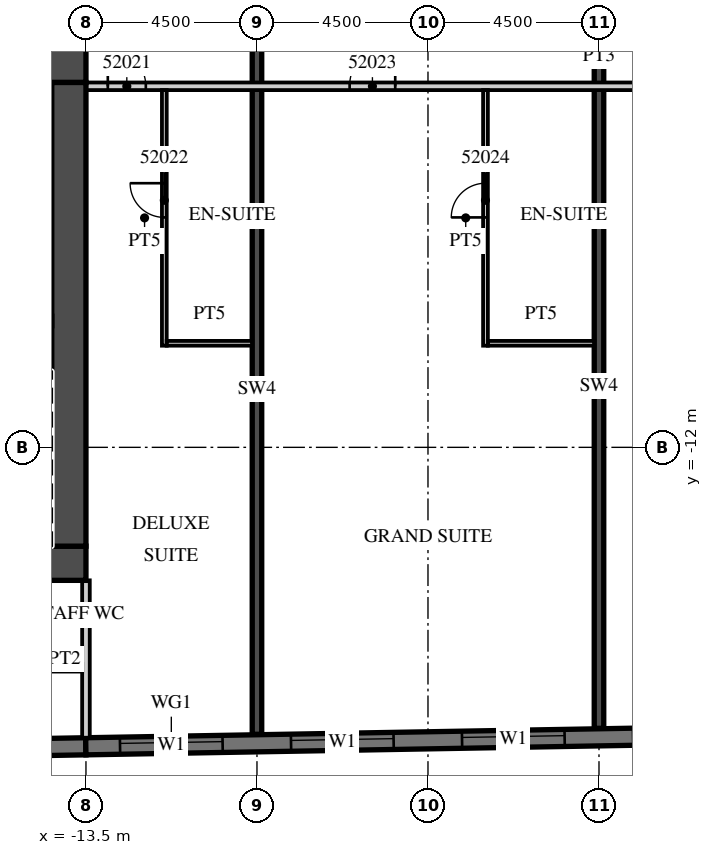
"""IFC4 building model, lengths in metres.
Left out: names, types, materials, properties, quantities, classifications, styles, units other than length and angle.
Written with IfcOpenShell. Run it as: python <this file> out.ifc"""

import sys

from ifc_helpers import new_model, si_unit, direction, frame, frame_2d, origin, place, context, subcontext, project, spatial, rectangle, extrude, element, fill, save


model = new_model("IFC4")
c1 = context("Model", 3, precision=1e-05, world=origin(), true_north=direction((0.0, 1.0)))
c2 = subcontext(c1, "Body", "Model", "MODEL_VIEW")
j1 = project(units=[si_unit("LENGTHUNIT", "METRE"), si_unit("PLANEANGLEUNIT", "RADIAN")], contexts=[c1])
p1 = place(None, origin())
s1 = spatial("IfcSite", under=j1, at=p1, CompositionType="ELEMENT")
p2 = place(p1, origin())
s2 = spatial("IfcBuilding", under=s1, at=p2, CompositionType="ELEMENT")
p3 = place(p2, frame((0.0, 0.0, 217.7)))
s3 = spatial("IfcBuildingStorey", under=s2, at=p3, CompositionType="ELEMENT", Elevation=217.7)
p4 = place(p3, frame((-9.0, -19.55, 0.0), z_axis=(0.0, 0.0, 1.0), x_axis=(0.0, 1.0, 0.0)))
e1 = element("IfcWall", 1, at=p4, inside=s3, PredefinedType="SHEAR", context=c2, shape_type="SweptSolid", body=[
    extrude(rectangle(XDim=18.15, YDim=0.25, at=frame_2d((9.075, 0.0))), origin(), (0.0, 0.0, 1.0), 3.3),
])
p5 = place(p3, frame((0.0, -19.393, 0.0), z_axis=(0.0, 0.0, 1.0), x_axis=(0.0, 1.0, 0.0)))
e2 = element("IfcWall", 2, at=p5, inside=s3, PredefinedType="SHEAR", context=c2, shape_type="SweptSolid", body=[
    extrude(rectangle(XDim=17.993, YDim=0.25, at=frame_2d((8.997, 0.0))), origin(), (0.0, 0.0, 1.0), 3.3),
])
p6 = place(p3, frame((-31.504, -20.18, 0.0), z_axis=(0.0, 0.0, 1.0), x_axis=(0.999847677887, 0.017453395744, 0.0)))
e3 = element("IfcWall", 3, at=p6, inside=s3, PredefinedType="SOLIDWALL", context=c2, shape_type="SweptSolid", body=[
    extrude(rectangle(XDim=18.003, YDim=0.45, at=frame_2d((9.001, 0.0))), origin(), (0.0, 0.0, 1.0), 3.02),
])
p7 = place(p3, frame((-13.504, -19.866, 0.0), z_axis=(0.0, 0.0, 1.0), x_axis=(0.999847672978, 0.017453676992, 0.0)))
e4 = element("IfcWall", 4, at=p7, inside=s3, PredefinedType="SOLIDWALL", context=c2, shape_type="SweptSolid", body=[
    extrude(rectangle(XDim=52.86, YDim=0.45, at=frame_2d((26.43, 0.0))), origin(), (0.0, 0.0, 1.0), 3.02),
])
p8 = place(p7, frame((0.9, 0.0, 0.45)))
e5 = element("IfcOpeningElement", 5, at=p8, cuts=e4, PredefinedType="OPENING", context=c2, shape_type="SweptSolid", body=[
    extrude(rectangle(XDim=2.7, YDim=2.25, at=frame_2d((1.35, 1.125))), frame((0.0, 0.235, 0.0), z_axis=(0.0, -1.0, 0.0), x_axis=(1.0, 0.0, 0.0)), (0.0, 0.0, 1.0), 0.47),
])
p9 = place(p7, frame((5.401, 0.0, 0.45)))
e6 = element("IfcOpeningElement", 6, at=p9, cuts=e4, PredefinedType="OPENING", context=c2, shape_type="SweptSolid", body=[
    extrude(rectangle(XDim=2.7, YDim=2.25, at=frame_2d((1.35, 1.125))), frame((0.0, 0.235, 0.0), z_axis=(0.0, -1.0, 0.0), x_axis=(1.0, 0.0, 0.0)), (0.0, 0.0, 1.0), 0.47),
])
p10 = place(p7, frame((9.902, 0.0, 0.45)))
e7 = element("IfcOpeningElement", 7, at=p10, cuts=e4, PredefinedType="OPENING", context=c2, shape_type="SweptSolid", body=[
    extrude(rectangle(XDim=2.7, YDim=2.25, at=frame_2d((1.35, 1.125))), frame((0.0, 0.235, 0.0), z_axis=(0.0, -1.0, 0.0), x_axis=(1.0, 0.0, 0.0)), (0.0, 0.0, 1.0), 0.47),
])
p11 = place(p7, frame((14.402, 0.0, 0.45)))
e8 = element("IfcOpeningElement", 8, at=p11, cuts=e4, PredefinedType="OPENING", context=c2, shape_type="SweptSolid", body=[
    extrude(rectangle(XDim=2.7, YDim=2.25, at=frame_2d((1.35, 1.125))), frame((0.0, 0.235, 0.0), z_axis=(0.0, -1.0, 0.0), x_axis=(1.0, 0.0, 0.0)), (0.0, 0.0, 1.0), 0.47),
])
p12 = place(p7, frame((18.903, 0.0, 0.45)))
e9 = element("IfcOpeningElement", 9, at=p12, cuts=e4, PredefinedType="OPENING", context=c2, shape_type="SweptSolid", body=[
    extrude(rectangle(XDim=2.7, YDim=2.25, at=frame_2d((1.35, 1.125))), frame((0.0, 0.235, 0.0), z_axis=(0.0, -1.0, 0.0), x_axis=(1.0, 0.0, 0.0)), (0.0, 0.0, 1.0), 0.47),
])
p13 = place(p7, frame((23.404, 0.0, 0.45)))
e10 = element("IfcOpeningElement", 10, at=p13, cuts=e4, PredefinedType="OPENING", context=c2, shape_type="SweptSolid", body=[
    extrude(rectangle(XDim=2.7, YDim=2.25, at=frame_2d((1.35, 1.125))), frame((0.0, 0.235, 0.0), z_axis=(0.0, -1.0, 0.0), x_axis=(1.0, 0.0, 0.0)), (0.0, 0.0, 1.0), 0.47),
])
p14 = place(p7, frame((27.904, 0.0, 0.45)))
e11 = element("IfcOpeningElement", 11, at=p14, cuts=e4, PredefinedType="OPENING", context=c2, shape_type="SweptSolid", body=[
    extrude(rectangle(XDim=2.7, YDim=2.25, at=frame_2d((1.35, 1.125))), frame((0.0, 0.235, 0.0), z_axis=(0.0, -1.0, 0.0), x_axis=(1.0, 0.0, 0.0)), (0.0, 0.0, 1.0), 0.47),
])
p15 = place(p7, frame((32.405, 0.0, 0.45)))
e12 = element("IfcOpeningElement", 12, at=p15, cuts=e4, PredefinedType="OPENING", context=c2, shape_type="SweptSolid", body=[
    extrude(rectangle(XDim=2.7, YDim=2.25, at=frame_2d((1.35, 1.125))), frame((0.0, 0.235, 0.0), z_axis=(0.0, -1.0, 0.0), x_axis=(1.0, 0.0, 0.0)), (0.0, 0.0, 1.0), 0.47),
])
p16 = place(p7, frame((36.906, 0.0, 0.45)))
e13 = element("IfcOpeningElement", 13, at=p16, cuts=e4, PredefinedType="OPENING", context=c2, shape_type="SweptSolid", body=[
    extrude(rectangle(XDim=2.7, YDim=2.25, at=frame_2d((1.35, 1.125))), frame((0.0, 0.235, 0.0), z_axis=(0.0, -1.0, 0.0), x_axis=(1.0, 0.0, 0.0)), (0.0, 0.0, 1.0), 0.47),
])
p17 = place(p7, frame((41.406, 0.0, 0.45)))
e14 = element("IfcOpeningElement", 14, at=p17, cuts=e4, PredefinedType="OPENING", context=c2, shape_type="SweptSolid", body=[
    extrude(rectangle(XDim=2.7, YDim=2.25, at=frame_2d((1.35, 1.125))), frame((0.0, 0.235, 0.0), z_axis=(0.0, -1.0, 0.0), x_axis=(1.0, 0.0, 0.0)), (0.0, 0.0, 1.0), 0.47),
])
p18 = place(p7, frame((45.907, 0.0, 0.45)))
e15 = element("IfcOpeningElement", 15, at=p18, cuts=e4, PredefinedType="OPENING", context=c2, shape_type="SweptSolid", body=[
    extrude(rectangle(XDim=2.7, YDim=2.25, at=frame_2d((1.35, 1.125))), frame((0.0, 0.235, 0.0), z_axis=(0.0, -1.0, 0.0), x_axis=(1.0, 0.0, 0.0)), (0.0, 0.0, 1.0), 0.47),
])
p19 = place(p3, frame((-13.5, -19.641, 0.0), z_axis=(0.0, 0.0, 1.0), x_axis=(0.0, 1.0, 0.0)))
e16 = element("IfcWall", 16, at=p19, inside=s3, PredefinedType="PARTITIONING", context=c2, shape_type="SweptSolid", body=[
    extrude(rectangle(XDim=4.141, YDim=0.2, at=frame_2d((2.071, 0.0))), origin(), (0.0, 0.0, 1.0), 3.02),
])
p20 = place(p3, frame((-13.5, -2.5, 0.0), z_axis=(0.0, 0.0, 1.0), x_axis=(1.0, 0.0, 0.0)))
e17 = element("IfcWall", 17, at=p20, inside=s3, PredefinedType="PARTITIONING", context=c2, shape_type="SweptSolid", body=[
    extrude(rectangle(XDim=27.0, YDim=0.2, at=frame_2d((13.5, 0.0))), origin(), (0.0, 0.0, 1.0), 3.02),
])
p21 = place(p20, frame((0.575, 0.0, 0.0)))
e18 = element("IfcOpeningElement", 18, at=p21, cuts=e17, PredefinedType="OPENING", context=c2, shape_type="SweptSolid", body=[
    extrude(rectangle(XDim=1.0, YDim=2.1, at=frame_2d((0.5, 1.05))), frame((0.0, 0.11, 0.0), z_axis=(0.0, -1.0, 0.0), x_axis=(1.0, 0.0, 0.0)), (0.0, 0.0, 1.0), 0.22),
])
p22 = place(p20, frame((6.938, 0.0, 0.0)))
e19 = element("IfcOpeningElement", 19, at=p22, cuts=e17, PredefinedType="OPENING", context=c2, shape_type="SweptSolid", body=[
    extrude(rectangle(XDim=1.2, YDim=2.1, at=frame_2d((0.6, 1.05))), frame((0.0, 0.11, 0.0), z_axis=(0.0, -1.0, 0.0), x_axis=(1.0, 0.0, 0.0)), (0.0, 0.0, 1.0), 0.22),
])
p23 = place(p20, frame((15.938, 0.0, 0.0)))
e20 = element("IfcOpeningElement", 20, at=p23, cuts=e17, PredefinedType="OPENING", context=c2, shape_type="SweptSolid", body=[
    extrude(rectangle(XDim=1.2, YDim=2.1, at=frame_2d((0.6, 1.05))), frame((0.0, 0.11, 0.0), z_axis=(0.0, -1.0, 0.0), x_axis=(1.0, 0.0, 0.0)), (0.0, 0.0, 1.0), 0.22),
])
p24 = place(p20, frame((25.425, 0.0, 0.0)))
e21 = element("IfcOpeningElement", 21, at=p24, cuts=e17, PredefinedType="OPENING", context=c2, shape_type="SweptSolid", body=[
    extrude(rectangle(XDim=1.0, YDim=2.1, at=frame_2d((0.5, 1.05))), frame((0.0, 0.11, 0.0), z_axis=(0.0, -1.0, 0.0), x_axis=(1.0, 0.0, 0.0)), (0.0, 0.0, 1.0), 0.22),
])
p25 = place(p3, frame((-11.438, -9.325, 0.0), z_axis=(0.0, 0.0, 1.0), x_axis=(0.0, 1.0, 0.0)))
e22 = element("IfcWall", 22, at=p25, inside=s3, PredefinedType="PARTITIONING", context=c2, shape_type="SweptSolid", body=[
    extrude(rectangle(XDim=6.725, YDim=0.125, at=frame_2d((3.362, 0.0))), origin(), (0.0, 0.0, 1.0), 3.02),
])
p26 = place(p25, frame((3.375, 0.0, 0.0)))
e23 = element("IfcOpeningElement", 23, at=p26, cuts=e22, PredefinedType="OPENING", context=c2, shape_type="SweptSolid", body=[
    extrude(rectangle(XDim=0.9, YDim=2.1, at=frame_2d((0.45, 1.05))), frame((0.0, 0.073, 0.0), z_axis=(0.0, -1.0, 0.0), x_axis=(1.0, 0.0, 0.0)), (0.0, 0.0, 1.0), 0.145),
])
p27 = place(p3, frame((-11.375, -9.262, 0.0), z_axis=(0.0, 0.0, 1.0), x_axis=(1.0, 0.0, 0.0)))
e24 = element("IfcWall", 24, at=p27, inside=s3, PredefinedType="PARTITIONING", context=c2, shape_type="SweptSolid", body=[
    extrude(rectangle(XDim=2.25, YDim=0.125, at=frame_2d((1.125, 0.0))), origin(), (0.0, 0.0, 1.0), 3.02),
])
p28 = place(p3, frame((-2.987, -9.325, 0.0), z_axis=(0.0, 0.0, 1.0), x_axis=(0.0, 1.0, 0.0)))
e25 = element("IfcWall", 25, at=p28, inside=s3, PredefinedType="PARTITIONING", context=c2, shape_type="SweptSolid", body=[
    extrude(rectangle(XDim=6.725, YDim=0.125, at=frame_2d((3.362, 0.0))), origin(), (0.0, 0.0, 1.0), 3.02),
])
p29 = place(p28, frame((3.375, 0.0, 0.0)))
e26 = element("IfcOpeningElement", 26, at=p29, cuts=e25, PredefinedType="OPENING", context=c2, shape_type="SweptSolid", body=[
    extrude(rectangle(XDim=0.9, YDim=2.1, at=frame_2d((0.45, 1.05))), frame((0.0, 0.073, 0.0), z_axis=(0.0, -1.0, 0.0), x_axis=(1.0, 0.0, 0.0)), (0.0, 0.0, 1.0), 0.145),
])
p30 = place(p3, frame((-2.925, -9.262, 0.0), z_axis=(0.0, 0.0, 1.0), x_axis=(1.0, 0.0, 0.0)))
e27 = element("IfcWall", 27, at=p30, inside=s3, PredefinedType="PARTITIONING", context=c2, shape_type="SweptSolid", body=[
    extrude(rectangle(XDim=2.8, YDim=0.125, at=frame_2d((1.4, 0.0))), origin(), (0.0, 0.0, 1.0), 3.02),
])
p31 = place(p3, frame((-31.5, -1.95, 0.0), z_axis=(0.0, 0.0, 1.0), x_axis=(1.0, 0.0, 0.0)))
e28 = element("IfcWall", 28, at=p31, inside=s3, PredefinedType="SHEAR", context=c2, shape_type="SweptSolid", body=[
    extrude(rectangle(XDim=18.0, YDim=0.9, at=frame_2d((9.0, 0.0))), origin(), (0.0, 0.0, 1.0), 3.02),
])
p32 = place(p31, frame((14.725, 0.0, 0.0)))
e29 = element("IfcOpeningElement", 29, at=p32, cuts=e28, PredefinedType="OPENING", context=c2, shape_type="SweptSolid", body=[
    extrude(rectangle(XDim=1.8, YDim=2.1, at=frame_2d((0.9, 1.05))), frame((0.0, 0.46, 0.0), z_axis=(0.0, -1.0, 0.0), x_axis=(1.0, 0.0, 0.0)), (0.0, 0.0, 1.0), 0.92),
])
p33 = place(p3, frame((-20.3, -15.05, 0.0), z_axis=(0.0, 0.0, 1.0), x_axis=(1.0, 0.0, 0.0)))
e30 = element("IfcWall", 30, at=p33, inside=s3, PredefinedType="SHEAR", context=c2, shape_type="SweptSolid", body=[
    extrude(rectangle(XDim=6.8, YDim=0.9, at=frame_2d((3.4, 0.0))), origin(), (0.0, 0.0, 1.0), 3.02),
])
p34 = place(p33, frame((0.875, 0.0, 0.0)))
e31 = element("IfcOpeningElement", 31, at=p34, cuts=e30, PredefinedType="OPENING", context=c2, shape_type="SweptSolid", body=[
    extrude(rectangle(XDim=1.2, YDim=2.1, at=frame_2d((0.6, 1.05))), frame((0.0, 0.46, 0.0), z_axis=(0.0, -1.0, 0.0), x_axis=(1.0, 0.0, 0.0)), (0.0, 0.0, 1.0), 0.92),
])
p35 = place(p3, frame((-13.95, -14.6, 0.0), z_axis=(0.0, 0.0, 1.0), x_axis=(0.0, 1.0, 0.0)))
e32 = element("IfcWall", 32, at=p35, inside=s3, PredefinedType="SHEAR", context=c2, shape_type="SweptSolid", body=[
    extrude(rectangle(XDim=12.2, YDim=0.9, at=frame_2d((6.1, 0.0))), origin(), (0.0, 0.0, 1.0), 3.02),
])
p36 = place(p3, frame((-35.864, -17.8, 0.0), z_axis=(0.0, 0.0, 1.0), x_axis=(1.0, 0.0, 0.0)))
e33 = element("IfcWall", 33, at=p36, inside=s3, PredefinedType="PARTITIONING", context=c2, shape_type="SweptSolid", body=[
    extrude(rectangle(XDim=22.264, YDim=0.2, at=frame_2d((11.132, 0.0))), origin(), (0.0, 0.0, 1.0), 3.02),
])
p37 = place(p36, frame((6.351, 0.0, 0.0)))
e34 = element("IfcOpeningElement", 34, at=p37, cuts=e33, PredefinedType="OPENING", context=c2, shape_type="SweptSolid", body=[
    extrude(rectangle(XDim=0.9, YDim=2.1, at=frame_2d((0.45, 1.05))), frame((0.0, 0.11, 0.0), z_axis=(0.0, -1.0, 0.0), x_axis=(1.0, 0.0, 0.0)), (0.0, 0.0, 1.0), 0.22),
])
p38 = place(p36, frame((14.651, 0.0, 0.0)))
e35 = element("IfcOpeningElement", 35, at=p38, cuts=e33, PredefinedType="OPENING", context=c2, shape_type="SweptSolid", body=[
    extrude(rectangle(XDim=0.9, YDim=2.1, at=frame_2d((0.45, 1.05))), frame((0.0, 0.11, 0.0), z_axis=(0.0, -1.0, 0.0), x_axis=(1.0, 0.0, 0.0)), (0.0, 0.0, 1.0), 0.22),
])
p39 = place(p8, origin())
e36 = element("IfcWindow", 36, at=p39, inside=s3, PartitioningType="SINGLE_PANEL", PredefinedType="WINDOW", context=c2, shape_type="SweptSolid", body=[
    extrude(rectangle(XDim=2.7, YDim=2.25, at=frame_2d((1.35, 1.125))), frame((0.0, 0.09, 0.0), z_axis=(0.0, -1.0, 0.0), x_axis=(1.0, 0.0, 0.0)), (0.0, 0.0, 1.0), 0.06),
])
fill(e5, e36)
p40 = place(p9, origin())
e37 = element("IfcWindow", 37, at=p40, inside=s3, PartitioningType="SINGLE_PANEL", PredefinedType="WINDOW", context=c2, shape_type="SweptSolid", body=[
    extrude(rectangle(XDim=2.7, YDim=2.25, at=frame_2d((1.35, 1.125))), frame((0.0, 0.09, 0.0), z_axis=(0.0, -1.0, 0.0), x_axis=(1.0, 0.0, 0.0)), (0.0, 0.0, 1.0), 0.06),
])
fill(e6, e37)
p41 = place(p10, origin())
e38 = element("IfcWindow", 38, at=p41, inside=s3, PartitioningType="SINGLE_PANEL", PredefinedType="WINDOW", context=c2, shape_type="SweptSolid", body=[
    extrude(rectangle(XDim=2.7, YDim=2.25, at=frame_2d((1.35, 1.125))), frame((0.0, 0.09, 0.0), z_axis=(0.0, -1.0, 0.0), x_axis=(1.0, 0.0, 0.0)), (0.0, 0.0, 1.0), 0.06),
])
fill(e7, e38)
p42 = place(p21, origin())
e39 = element("IfcDoor", 39, at=p42, inside=s3, OperationType="SINGLE_SWING_LEFT", PredefinedType="DOOR", context=c2, shape_type="SweptSolid", body=[
    extrude(rectangle(XDim=1.0, YDim=2.1, at=frame_2d((0.5, 1.05))), frame((0.0, 0.025, 0.0), z_axis=(0.0, -1.0, 0.0), x_axis=(1.0, 0.0, 0.0)), (0.0, 0.0, 1.0), 0.05),
])
fill(e18, e39)
p43 = place(p26, origin())
e40 = element("IfcDoor", 40, at=p43, inside=s3, OperationType="SINGLE_SWING_RIGHT", PredefinedType="DOOR", context=c2, shape_type="SweptSolid", body=[
    extrude(rectangle(XDim=0.9, YDim=2.1, at=frame_2d((0.45, 1.05))), frame((0.0, 0.025, 0.0), z_axis=(0.0, -1.0, 0.0), x_axis=(1.0, 0.0, 0.0)), (0.0, 0.0, 1.0), 0.05),
])
fill(e23, e40)
p44 = place(p22, origin())
e41 = element("IfcDoor", 41, at=p44, inside=s3, OperationType="SINGLE_SWING_RIGHT", PredefinedType="DOOR", context=c2, shape_type="SweptSolid", body=[
    extrude(rectangle(XDim=1.2, YDim=2.1, at=frame_2d((0.6, 1.05))), frame((0.0, 0.025, 0.0), z_axis=(0.0, -1.0, 0.0), x_axis=(1.0, 0.0, 0.0)), (0.0, 0.0, 1.0), 0.05),
])
fill(e19, e41)
p45 = place(p29, origin())
e42 = element("IfcDoor", 42, at=p45, inside=s3, OperationType="SINGLE_SWING_LEFT", PredefinedType="DOOR", context=c2, shape_type="SweptSolid", body=[
    extrude(rectangle(XDim=0.9, YDim=2.1, at=frame_2d((0.45, 1.05))), frame((0.0, 0.025, 0.0), z_axis=(0.0, -1.0, 0.0), x_axis=(1.0, 0.0, 0.0)), (0.0, 0.0, 1.0), 0.05),
])
fill(e26, e42)
save(model, sys.argv[1])
